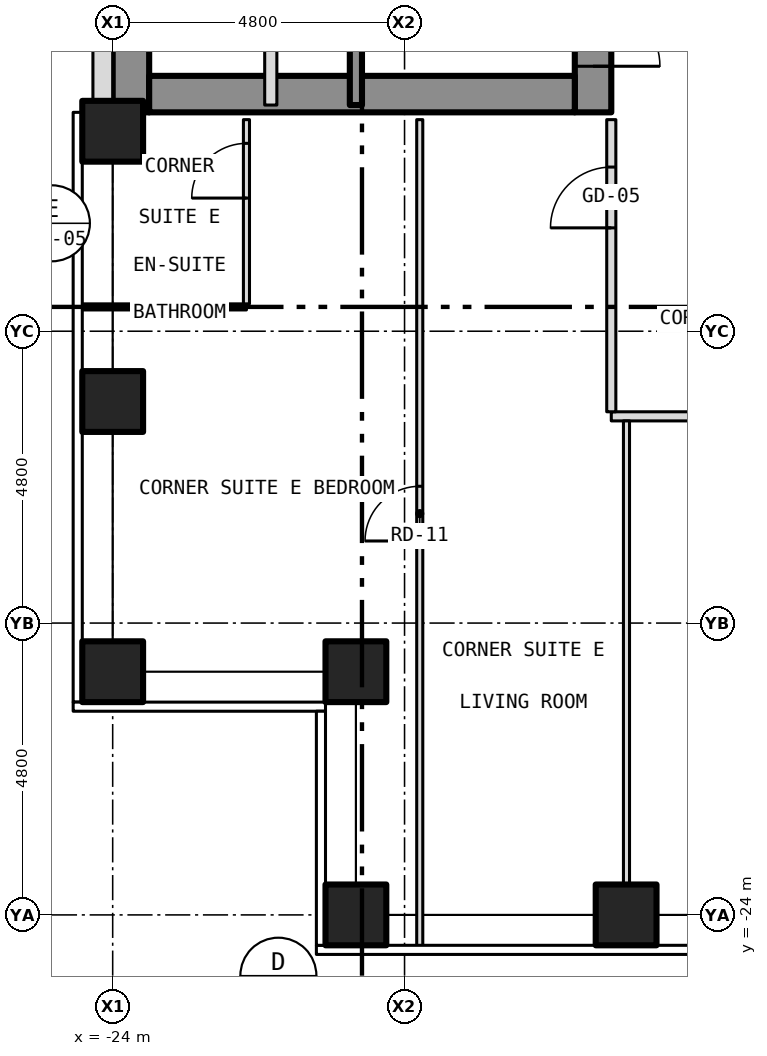
"""IFC4 building model, lengths in metres.
Left out: names, types, materials, properties, quantities, classifications, styles, units other than length and angle.
Written with IfcOpenShell. Run it as: python <this file> out.ifc"""

import sys

from ifc_helpers import new_model, si_unit, direction, frame, frame_2d, origin, origin_2d, place, context, subcontext, project, spatial, rectangle, hollow_rectangle, extrude, element, fill, save


model = new_model("IFC4")
c1 = context("Model", 3, precision=1e-05, world=origin(), true_north=direction((0.0, 1.0)))
c2 = subcontext(c1, "Body", "Model", "MODEL_VIEW")
j1 = project(units=[si_unit("LENGTHUNIT", "METRE"), si_unit("PLANEANGLEUNIT", "RADIAN")], contexts=[c1])
p1 = place(None, origin())
s1 = spatial("IfcSite", under=j1, at=p1, CompositionType="ELEMENT")
p2 = place(p1, origin())
s2 = spatial("IfcBuilding", under=s1, at=p2, CompositionType="ELEMENT")
p3 = place(p2, frame((0.0, 0.0, 70.5)))
s3 = spatial("IfcBuildingStorey", under=s2, at=p3, CompositionType="ELEMENT", Elevation=70.5)
for number, where, z_axis, x_axis in (
    (1, (-20.0, -24.0, -0.15), (0.0, 0.0, 1.0), (1.0, 0.0, 0.0)),
    (2, (-15.556, -24.0, -0.15), (0.0, 0.0, 1.0), (1.0, 0.0, 0.0)),
    (3, (-24.0, -20.0, -0.15), (0.0, 0.0, 1.0), (1.0, 0.0, 0.0)),
    (4, (-24.0, -15.556, -0.15), (0.0, 0.0, 1.0), (1.0, 0.0, 0.0)),
    (5, (-24.0, -11.111, -0.15), (0.0, 0.0, 1.0), (1.0, 0.0, 0.0)),
    (6, (-20.0, -20.0, -0.15), (0.0, 0.0, 1.0), (1.0, 0.0, 0.0)),
):
    element("IfcColumn", number, at=place(p3, frame(where, z_axis=z_axis, x_axis=x_axis)), inside=s3, PredefinedType="COLUMN", context=c2, shape_type="SweptSolid", body=[
        extrude(hollow_rectangle(XDim=1.0, YDim=1.0, WallThickness=0.06, at=origin_2d()), origin(), (0.0, 0.0, 1.0), 3.5),
    ])
p4 = place(p3, frame((-16.1, -10.8, 0.0), z_axis=(0.0, 0.0, 1.0), x_axis=(0.0, 1.0, 0.0)))
e7 = element("IfcWall", 7, at=p4, inside=s3, PredefinedType="SHEAR", context=c2, shape_type="SweptSolid", body=[
    extrude(rectangle(XDim=21.6, YDim=0.6, at=frame_2d((10.8, 0.0))), origin(), (0.0, 0.0, 1.0), 3.25),
])
p5 = place(p4, frame((9.4, 0.0, 0.0)))
e8 = element("IfcOpeningElement", 8, at=p5, cuts=e7, PredefinedType="OPENING", context=c2, shape_type="SweptSolid", body=[
    extrude(rectangle(XDim=1.1, YDim=2.1, at=frame_2d((0.55, 1.05))), frame((0.0, 0.312, 0.0), z_axis=(0.0, -1.0, 0.0), x_axis=(1.0, 0.0, 0.0)), (0.0, 0.0, 1.0), 0.624),
])
p6 = place(p4, frame((11.5, 0.0, 0.0)))
e9 = element("IfcOpeningElement", 9, at=p6, cuts=e7, PredefinedType="OPENING", context=c2, shape_type="SweptSolid", body=[
    extrude(rectangle(XDim=1.1, YDim=2.1, at=frame_2d((0.55, 1.05))), frame((0.0, 0.312, 0.0), z_axis=(0.0, -1.0, 0.0), x_axis=(1.0, 0.0, 0.0)), (0.0, 0.0, 1.0), 0.624),
])
p7 = place(p4, frame((13.6, 0.0, 0.0)))
e10 = element("IfcOpeningElement", 10, at=p7, cuts=e7, PredefinedType="OPENING", context=c2, shape_type="SweptSolid", body=[
    extrude(rectangle(XDim=1.1, YDim=2.1, at=frame_2d((0.55, 1.05))), frame((0.0, 0.312, 0.0), z_axis=(0.0, -1.0, 0.0), x_axis=(1.0, 0.0, 0.0)), (0.0, 0.0, 1.0), 0.624),
])
p8 = place(p4, frame((15.7, 0.0, 0.0)))
e11 = element("IfcOpeningElement", 11, at=p8, cuts=e7, PredefinedType="OPENING", context=c2, shape_type="SweptSolid", body=[
    extrude(rectangle(XDim=1.1, YDim=2.1, at=frame_2d((0.55, 1.05))), frame((0.0, 0.312, 0.0), z_axis=(0.0, -1.0, 0.0), x_axis=(1.0, 0.0, 0.0)), (0.0, 0.0, 1.0), 0.624),
])
p9 = place(p4, frame((17.8, 0.0, 0.0)))
e12 = element("IfcOpeningElement", 12, at=p9, cuts=e7, PredefinedType="OPENING", context=c2, shape_type="SweptSolid", body=[
    extrude(rectangle(XDim=1.1, YDim=2.1, at=frame_2d((0.55, 1.05))), frame((0.0, 0.312, 0.0), z_axis=(0.0, -1.0, 0.0), x_axis=(1.0, 0.0, 0.0)), (0.0, 0.0, 1.0), 0.624),
])
p10 = place(p4, frame((0.758, 0.0, 0.0)))
e13 = element("IfcOpeningElement", 13, at=p10, cuts=e7, PredefinedType="OPENING", context=c2, shape_type="SweptSolid", body=[
    extrude(rectangle(XDim=1.1, YDim=2.1, at=frame_2d((0.55, 1.05))), frame((0.0, 0.312, 0.0), z_axis=(0.0, -1.0, 0.0), x_axis=(1.0, 0.0, 0.0)), (0.0, 0.0, 1.0), 0.624),
])
p11 = place(p4, frame((7.5, 0.0, 0.0)))
e14 = element("IfcOpeningElement", 14, at=p11, cuts=e7, PredefinedType="OPENING", context=c2, shape_type="SweptSolid", body=[
    extrude(rectangle(XDim=1.1, YDim=2.1, at=frame_2d((0.55, 1.05))), frame((0.0, 0.312, 0.0), z_axis=(0.0, -1.0, 0.0), x_axis=(1.0, 0.0, 0.0)), (0.0, 0.0, 1.0), 0.624),
])
p12 = place(p3, frame((-23.7, -10.8, 0.0), z_axis=(0.0, 0.0, 1.0), x_axis=(0.0, 1.0, 0.0)))
e15 = element("IfcWall", 15, at=p12, inside=s3, PredefinedType="SHEAR", context=c2, shape_type="SweptSolid", body=[
    extrude(rectangle(XDim=21.6, YDim=0.6, at=frame_2d((10.8, 0.0))), origin(), (0.0, 0.0, 1.0), 3.25),
])
p13 = place(p3, frame((-23.4, -10.5, 0.0), z_axis=(0.0, 0.0, 1.0), x_axis=(1.0, 0.0, 0.0)))
e16 = element("IfcWall", 16, at=p13, inside=s3, PredefinedType="SHEAR", context=c2, shape_type="SweptSolid", body=[
    extrude(rectangle(XDim=7.0, YDim=0.6, at=frame_2d((3.5, 0.0))), origin(), (0.0, 0.0, 1.0), 3.25),
])
p14 = place(p3, frame((-24.163, 10.8, 0.0), z_axis=(0.0, 0.0, 1.0), x_axis=(0.0, -1.0, 0.0)))
e17 = element("IfcWall", 17, at=p14, inside=s3, PredefinedType="SOLIDWALL", context=c2, shape_type="SweptSolid", body=[
    extrude(rectangle(XDim=21.6, YDim=0.325, at=frame_2d((10.8, 0.0))), origin(), (0.0, 0.0, 1.0), 3.5),
])
p15 = place(p14, frame((18.05, 0.0, 1.0)))
e18 = element("IfcOpeningElement", 18, at=p15, cuts=e17, PredefinedType="OPENING", context=c2, shape_type="SweptSolid", body=[
    extrude(rectangle(XDim=0.6, YDim=1.5, at=frame_2d((0.3, 0.75))), frame((0.0, 0.175, 0.0), z_axis=(0.0, -1.0, 0.0), x_axis=(1.0, 0.0, 0.0)), (0.0, 0.0, 1.0), 0.349),
])
p16 = place(p3, frame((-15.8, -15.8, 0.0), z_axis=(0.0, 0.0, 1.0), x_axis=(1.0, 0.0, 0.0)))
e19 = element("IfcWall", 19, at=p16, inside=s3, PredefinedType="PARTITIONING", context=c2, shape_type="SweptSolid", body=[
    extrude(rectangle(XDim=6.65, YDim=0.15, at=frame_2d((3.325, 0.0))), origin(), (0.0, 0.0, 1.0), 3.35),
])
p17 = place(p16, frame((1.847, 0.0, 0.0)))
e20 = element("IfcOpeningElement", 20, at=p17, cuts=e19, PredefinedType="OPENING", context=c2, shape_type="SweptSolid", body=[
    extrude(rectangle(XDim=1.0, YDim=2.1, at=frame_2d((0.5, 1.05))), frame((0.0, 0.087, 0.0), z_axis=(0.0, -1.0, 0.0), x_axis=(1.0, 0.0, 0.0)), (0.0, 0.0, 1.0), 0.174),
])
p18 = place(p3, frame((-24.53, -14.0, 0.0), z_axis=(0.0, 0.0, 1.0), x_axis=(1.0, 0.0, 0.0)))
e21 = element("IfcWall", 21, at=p18, inside=s3, PredefinedType="PARTITIONING", context=c2, shape_type="SweptSolid", body=[
    extrude(rectangle(XDim=2.73, YDim=0.1, at=frame_2d((1.365, 0.0))), origin(), (0.0, 0.0, 1.0), 3.35),
])
p19 = place(p3, frame((-21.8, -13.95, 0.0), z_axis=(0.0, 0.0, 1.0), x_axis=(0.0, 1.0, 0.0)))
e22 = element("IfcWall", 22, at=p19, inside=s3, PredefinedType="PARTITIONING", context=c2, shape_type="SweptSolid", body=[
    extrude(rectangle(XDim=3.03, YDim=0.1, at=frame_2d((1.515, 0.0))), origin(), (0.0, 0.0, 1.0), 3.35),
])
p20 = place(p19, frame((1.74, 0.0, 0.0)))
e23 = element("IfcOpeningElement", 23, at=p20, cuts=e22, PredefinedType="OPENING", context=c2, shape_type="SweptSolid", body=[
    extrude(rectangle(XDim=0.9, YDim=2.1, at=frame_2d((0.45, 1.05))), frame((0.0, 0.062, 0.0), z_axis=(0.0, -1.0, 0.0), x_axis=(1.0, 0.0, 0.0)), (0.0, 0.0, 1.0), 0.124),
])
p21 = place(p3, frame((-21.4, -10.68, 0.0), z_axis=(0.0, 0.0, 1.0), x_axis=(0.0, 1.0, 0.0)))
e24 = element("IfcWall", 24, at=p21, inside=s3, PredefinedType="PARTITIONING", context=c2, shape_type="SweptSolid", body=[
    extrude(rectangle(XDim=8.68, YDim=0.2, at=frame_2d((4.34, 0.0))), origin(), (0.0, 0.0, 1.0), 3.25),
])
p22 = place(p21, frame((2.1, 0.0, 0.0)))
e25 = element("IfcOpeningElement", 25, at=p22, cuts=e24, PredefinedType="OPENING", context=c2, shape_type="SweptSolid", body=[
    extrude(rectangle(XDim=0.9, YDim=2.1, at=frame_2d((0.45, 1.05))), frame((0.0, 0.112, 0.0), z_axis=(0.0, -1.0, 0.0), x_axis=(1.0, 0.0, 0.0)), (0.0, 0.0, 1.0), 0.224),
])
p23 = place(p21, frame((6.55, 0.0, 0.0)))
e26 = element("IfcOpeningElement", 26, at=p23, cuts=e24, PredefinedType="OPENING", context=c2, shape_type="SweptSolid", body=[
    extrude(rectangle(XDim=0.9, YDim=2.1, at=frame_2d((0.45, 1.05))), frame((0.0, 0.112, 0.0), z_axis=(0.0, -1.0, 0.0), x_axis=(1.0, 0.0, 0.0)), (0.0, 0.0, 1.0), 0.224),
])
p24 = place(p3, frame((-20.0, -10.68, 0.0), z_axis=(0.0, 0.0, 1.0), x_axis=(0.0, 1.0, 0.0)))
e27 = element("IfcWall", 27, at=p24, inside=s3, PredefinedType="SHEAR", context=c2, shape_type="SweptSolid", body=[
    extrude(rectangle(XDim=6.98, YDim=0.2, at=frame_2d((3.49, 0.0))), origin(), (0.0, 0.0, 1.0), 3.25),
])
p25 = place(p3, frame((-18.95, -24.53, 0.0), z_axis=(0.0, 0.0, 1.0), x_axis=(0.0, 1.0, 0.0)))
e28 = element("IfcWall", 28, at=p25, inside=s3, PredefinedType="PARTITIONING", context=c2, shape_type="SweptSolid", body=[
    extrude(rectangle(XDim=13.61, YDim=0.1, at=frame_2d((6.805, 0.0))), origin(), (0.0, 0.0, 1.0), 3.35),
])
p26 = place(p25, frame((6.68, 0.0, 0.0)))
e29 = element("IfcOpeningElement", 29, at=p26, cuts=e28, PredefinedType="OPENING", context=c2, shape_type="SweptSolid", body=[
    extrude(rectangle(XDim=0.9, YDim=2.1, at=frame_2d((0.45, 1.05))), frame((0.0, 0.062, 0.0), z_axis=(0.0, -1.0, 0.0), x_axis=(1.0, 0.0, 0.0)), (0.0, 0.0, 1.0), 0.124),
])
p27 = place(p3, frame((-15.8, -15.725, 0.0), z_axis=(0.0, 0.0, 1.0), x_axis=(0.0, 1.0, 0.0)))
e30 = element("IfcWall", 30, at=p27, inside=s3, PredefinedType="PARTITIONING", context=c2, shape_type="SweptSolid", body=[
    extrude(rectangle(XDim=4.805, YDim=0.15, at=frame_2d((2.403, 0.0))), origin(), (0.0, 0.0, 1.0), 3.35),
])
p28 = place(p27, frame((3.025, 0.0, 0.0)))
e31 = element("IfcOpeningElement", 31, at=p28, cuts=e30, PredefinedType="OPENING", context=c2, shape_type="SweptSolid", body=[
    extrude(rectangle(XDim=1.0, YDim=2.1, at=frame_2d((0.5, 1.05))), frame((0.0, 0.087, 0.0), z_axis=(0.0, -1.0, 0.0), x_axis=(1.0, 0.0, 0.0)), (0.0, 0.0, 1.0), 0.174),
])
p29 = place(p3, frame((-15.55, -23.88, 0.0), z_axis=(0.0, 0.0, 1.0), x_axis=(0.0, 1.0, 0.0)))
e32 = element("IfcWall", 32, at=p29, inside=s3, PredefinedType="PARTITIONING", context=c2, shape_type="SweptSolid", body=[
    extrude(rectangle(XDim=8.005, YDim=0.1, at=frame_2d((4.002, 0.0))), origin(), (0.0, 0.0, 1.0), 3.35),
])
p30 = place(p10, origin())
e33 = element("IfcDoor", 33, at=p30, inside=s3, OperationType="SINGLE_SWING_LEFT", PredefinedType="DOOR", context=c2, shape_type="SweptSolid", body=[
    extrude(rectangle(XDim=1.1, YDim=2.1, at=frame_2d((0.55, 1.05))), frame((0.0, 0.025, 0.0), z_axis=(0.0, -1.0, 0.0), x_axis=(1.0, 0.0, 0.0)), (0.0, 0.0, 1.0), 0.05),
])
fill(e13, e33)
p31 = place(p28, origin())
e34 = element("IfcDoor", 34, at=p31, inside=s3, OperationType="SINGLE_SWING_LEFT", PredefinedType="DOOR", context=c2, shape_type="SweptSolid", body=[
    extrude(rectangle(XDim=1.0, YDim=2.1, at=frame_2d((0.5, 1.05))), frame((0.0, 0.025, 0.0), z_axis=(0.0, -1.0, 0.0), x_axis=(1.0, 0.0, 0.0)), (0.0, 0.0, 1.0), 0.05),
])
fill(e31, e34)
p32 = place(p26, origin())
e35 = element("IfcDoor", 35, at=p32, inside=s3, OperationType="SINGLE_SWING_LEFT", PredefinedType="DOOR", context=c2, shape_type="SweptSolid", body=[
    extrude(rectangle(XDim=0.9, YDim=2.1, at=frame_2d((0.45, 1.05))), frame((0.0, 0.025, 0.0), z_axis=(0.0, -1.0, 0.0), x_axis=(1.0, 0.0, 0.0)), (0.0, 0.0, 1.0), 0.05),
])
fill(e29, e35)
p33 = place(p20, origin())
e36 = element("IfcDoor", 36, at=p33, inside=s3, OperationType="SINGLE_SWING_LEFT", PredefinedType="DOOR", context=c2, shape_type="SweptSolid", body=[
    extrude(rectangle(XDim=0.9, YDim=2.1, at=frame_2d((0.45, 1.05))), frame((0.0, 0.025, 0.0), z_axis=(0.0, -1.0, 0.0), x_axis=(1.0, 0.0, 0.0)), (0.0, 0.0, 1.0), 0.05),
])
fill(e23, e36)
save(model, sys.argv[1])
